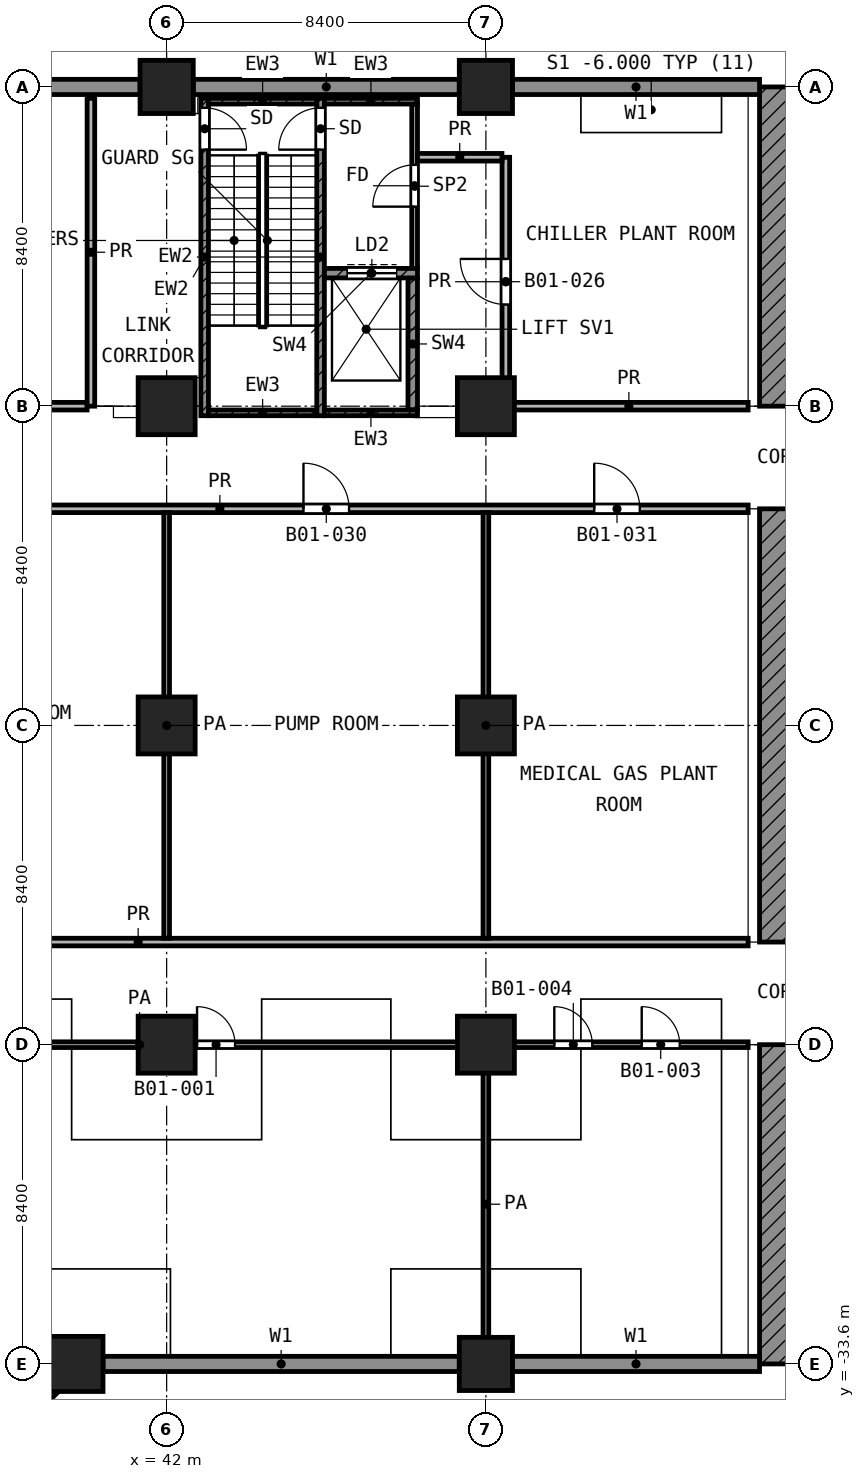
"""IFC4 building model, lengths in metres.
Left out: names, types, materials, properties, quantities, classifications, styles, units other than length and angle.
Written with IfcOpenShell. Run it as: python <this file> out.ifc"""

import sys

from ifc_helpers import new_model, si_unit, direction, frame, frame_2d, origin, origin_2d, place, context, subcontext, project, spatial, polyline, rectangle, outline, extrude, element, fill, save


model = new_model("IFC4")
c1 = context("Model", 3, precision=1e-05, world=origin(), true_north=direction((0.0, 1.0)))
c2 = subcontext(c1, "Body", "Model", "MODEL_VIEW")
j1 = project(units=[si_unit("LENGTHUNIT", "METRE"), si_unit("PLANEANGLEUNIT", "RADIAN")], contexts=[c1])
p1 = place(None, origin())
s1 = spatial("IfcSite", under=j1, at=p1, CompositionType="ELEMENT")
p2 = place(p1, origin())
s2 = spatial("IfcBuilding", under=s1, at=p2, CompositionType="ELEMENT")
p3 = place(p2, frame((0.0, 0.0, -6.0)))
s3 = spatial("IfcBuildingStorey", under=s2, at=p3, CompositionType="ELEMENT", Elevation=-6.0)
p4 = place(p3, origin())
e1 = element("IfcWall", 1, at=p4, inside=s3, PredefinedType="SOLIDWALL", context=c2, shape_type="SweptSolid", body=[
    extrude(outline(polyline([(41.3, -0.2), (34.3, -0.2), (34.3, 0.2), (41.3, 0.2), (41.3, -0.2)])), origin(), (0.0, 0.0, 1.0), 5.55),
])
e2 = element("IfcWall", 2, at=p4, inside=s3, PredefinedType="SOLIDWALL", context=c2, shape_type="SweptSolid", body=[
    extrude(outline(polyline([(49.7, -0.2), (42.7, -0.2), (42.7, 0.2), (49.7, 0.2), (49.7, -0.2)])), origin(), (0.0, 0.0, 1.0), 5.55),
])
e3 = element("IfcWall", 3, at=p4, inside=s3, PredefinedType="SOLIDWALL", context=c2, shape_type="SweptSolid", body=[
    extrude(outline(polyline([(57.6, -0.2), (51.1, -0.2), (51.1, 0.2), (57.6, 0.2), (57.6, -0.2)])), origin(), (0.0, 0.0, 1.0), 5.55),
])
e4 = element("IfcWall", 4, at=p4, inside=s3, PredefinedType="SOLIDWALL", context=c2, shape_type="SweptSolid", body=[
    extrude(outline(polyline([(40.325, -33.4), (49.7, -33.4), (49.7, -33.8), (40.325, -33.8), (40.325, -33.4)])), origin(), (0.0, 0.0, 1.0), 5.55),
])
e5 = element("IfcWall", 5, at=p4, inside=s3, PredefinedType="SOLIDWALL", context=c2, shape_type="SweptSolid", body=[
    extrude(outline(polyline([(51.1, -33.4), (57.6, -33.4), (57.6, -33.8), (51.1, -33.8), (51.1, -33.4)])), origin(), (0.0, 0.0, 1.0), 5.55),
])
e6 = element("IfcWall", 6, at=p4, inside=s3, PredefinedType="SOLIDWALL", context=c2, shape_type="SweptSolid", body=[
    extrude(outline(polyline([(34.325, -38.875), (34.042, -38.875), (38.875, -34.042), (38.875, -34.325), (39.158, -34.325), (34.325, -39.158), (34.325, -38.875)])), origin(), (0.0, 0.0, 1.0), 5.55),
])
for number, where, z_axis, x_axis in (
    (7, (42.0, 0.0, 0.0), (0.0, 0.0, 1.0), (1.0, 0.0, 0.0)),
    (8, (50.4, 0.0, 0.0), (0.0, 0.0, 1.0), (1.0, 0.0, 0.0)),
):
    element("IfcColumn", number, at=place(p3, frame(where, z_axis=z_axis, x_axis=x_axis)), inside=s3, PredefinedType="COLUMN", context=c2, shape_type="SweptSolid", body=[
        extrude(rectangle(XDim=1.4, YDim=1.4, at=origin_2d()), origin(), (0.0, 0.0, 1.0), 6.0),
    ])
for number, where, z_axis, x_axis in (
    (9, (42.0, -8.4, 0.0), (0.0, 0.0, 1.0), (1.0, 0.0, 0.0)),
    (10, (50.4, -8.4, 0.0), (0.0, 0.0, 1.0), (1.0, 0.0, 0.0)),
    (11, (42.0, -16.8, 0.0), (0.0, 0.0, 1.0), (1.0, 0.0, 0.0)),
    (12, (50.4, -16.8, 0.0), (0.0, 0.0, 1.0), (1.0, 0.0, 0.0)),
    (13, (42.0, -25.2, 0.0), (0.0, 0.0, 1.0), (1.0, 0.0, 0.0)),
    (14, (50.4, -25.2, 0.0), (0.0, 0.0, 1.0), (1.0, 0.0, 0.0)),
):
    element("IfcColumn", number, at=place(p3, frame(where, z_axis=z_axis, x_axis=x_axis)), inside=s3, PredefinedType="COLUMN", context=c2, shape_type="SweptSolid", body=[
        extrude(rectangle(XDim=1.5, YDim=1.5, at=origin_2d()), origin(), (0.0, 0.0, 1.0), 6.0),
    ])
p5 = place(p3, frame((39.6, -33.6, 0.0), z_axis=(0.0, 0.0, 1.0), x_axis=(1.0, 0.0, 0.0)))
e15 = element("IfcColumn", 15, at=p5, inside=s3, PredefinedType="COLUMN", context=c2, shape_type="SweptSolid", body=[
    extrude(rectangle(XDim=1.45, YDim=1.45, at=origin_2d()), origin(), (0.0, 0.0, 1.0), 6.0),
])
p6 = place(p3, frame((50.4, -33.6, 0.0), z_axis=(0.0, 0.0, 1.0), x_axis=(1.0, 0.0, 0.0)))
e16 = element("IfcColumn", 16, at=p6, inside=s3, PredefinedType="COLUMN", context=c2, shape_type="SweptSolid", body=[
    extrude(rectangle(XDim=1.4, YDim=1.4, at=origin_2d()), origin(), (0.0, 0.0, 1.0), 6.0),
])
p7 = place(p3, frame((0.0, 0.0, 6.0), z_axis=(0.0, -1.0, 0.0), x_axis=(1.0, 0.0, 0.0)))
e17 = element("IfcWall", 17, at=p7, inside=s3, PredefinedType="SHEAR", context=c2, shape_type="SweptSolid", body=[
    extrude(outline(polyline([(60.0, 0.0), (60.0, -6.0), (57.6, -6.0), (57.6, 0.0), (60.0, 0.0)])), origin(), (0.0, 0.0, 1.0), 8.4),
])
p8 = place(p3, frame((0.0, -11.1, 6.0), z_axis=(0.0, -1.0, 0.0), x_axis=(1.0, 0.0, 0.0)))
e18 = element("IfcWall", 18, at=p8, inside=s3, PredefinedType="SHEAR", context=c2, shape_type="SweptSolid", body=[
    extrude(outline(polyline([(60.0, 0.0), (60.0, -6.0), (57.6, -6.0), (57.6, 0.0), (60.0, 0.0)])), origin(), (0.0, 0.0, 1.0), 11.4),
])
p9 = place(p3, frame((0.0, -25.2, 6.0), z_axis=(0.0, -1.0, 0.0), x_axis=(1.0, 0.0, 0.0)))
e19 = element("IfcWall", 19, at=p9, inside=s3, PredefinedType="SHEAR", context=c2, shape_type="SweptSolid", body=[
    extrude(outline(polyline([(60.0, 0.0), (60.0, -6.0), (57.6, -6.0), (57.6, 0.0), (60.0, 0.0)])), origin(), (0.0, 0.0, 1.0), 8.4),
])
p10 = place(p3, frame((43.0, -8.65, 0.0), z_axis=(0.0, 0.0, 1.0), x_axis=(0.0, 1.0, 0.0)))
e20 = element("IfcWall", 20, at=p10, inside=s3, PredefinedType="SHEAR", context=c2, shape_type="SweptSolid", body=[
    extrude(rectangle(XDim=8.35, YDim=0.2, at=frame_2d((4.175, 0.0))), origin(), (0.0, 0.0, 1.0), 5.55),
])
p11 = place(p10, frame((7.0, 0.0, 0.0)))
e21 = element("IfcOpeningElement", 21, at=p11, cuts=e20, PredefinedType="OPENING", context=c2, shape_type="SweptSolid", body=[
    extrude(rectangle(XDim=1.1, YDim=2.1, at=frame_2d((0.55, 1.05))), frame((0.0, 0.11, 0.0), z_axis=(0.0, -1.0, 0.0), x_axis=(1.0, 0.0, 0.0)), (0.0, 0.0, 1.0), 0.22),
])
p12 = place(p3, frame((46.05, -8.65, 0.0), z_axis=(0.0, 0.0, 1.0), x_axis=(0.0, 1.0, 0.0)))
e22 = element("IfcWall", 22, at=p12, inside=s3, PredefinedType="SHEAR", context=c2, shape_type="SweptSolid", body=[
    extrude(rectangle(XDim=8.35, YDim=0.2, at=frame_2d((4.175, 0.0))), origin(), (0.0, 0.0, 1.0), 5.55),
])
p13 = place(p12, frame((7.0, 0.0, 0.0)))
e23 = element("IfcOpeningElement", 23, at=p13, cuts=e22, PredefinedType="OPENING", context=c2, shape_type="SweptSolid", body=[
    extrude(rectangle(XDim=1.1, YDim=2.1, at=frame_2d((0.55, 1.05))), frame((0.0, 0.11, 0.0), z_axis=(0.0, -1.0, 0.0), x_axis=(1.0, 0.0, 0.0)), (0.0, 0.0, 1.0), 0.22),
])
p14 = place(p3, frame((43.1, -0.375, 0.0), z_axis=(0.0, 0.0, 1.0), x_axis=(1.0, 0.0, 0.0)))
e24 = element("IfcWall", 24, at=p14, inside=s3, PredefinedType="SHEAR", context=c2, shape_type="SweptSolid", body=[
    extrude(rectangle(XDim=2.85, YDim=0.15, at=frame_2d((1.425, 0.0))), origin(), (0.0, 0.0, 1.0), 5.55),
])
p15 = place(p3, frame((46.15, -0.375, 0.0), z_axis=(0.0, 0.0, 1.0), x_axis=(1.0, 0.0, 0.0)))
e25 = element("IfcWall", 25, at=p15, inside=s3, PredefinedType="SHEAR", context=c2, shape_type="SweptSolid", body=[
    extrude(rectangle(XDim=2.45, YDim=0.15, at=frame_2d((1.225, 0.0))), origin(), (0.0, 0.0, 1.0), 5.55),
])
p16 = place(p3, frame((43.1, -8.575, 0.0), z_axis=(0.0, 0.0, 1.0), x_axis=(1.0, 0.0, 0.0)))
e26 = element("IfcWall", 26, at=p16, inside=s3, PredefinedType="SHEAR", context=c2, shape_type="SweptSolid", body=[
    extrude(rectangle(XDim=2.85, YDim=0.15, at=frame_2d((1.425, 0.0))), origin(), (0.0, 0.0, 1.0), 5.55),
])
p17 = place(p3, frame((46.15, -8.575, 0.0), z_axis=(0.0, 0.0, 1.0), x_axis=(1.0, 0.0, 0.0)))
e27 = element("IfcWall", 27, at=p17, inside=s3, PredefinedType="SHEAR", context=c2, shape_type="SweptSolid", body=[
    extrude(rectangle(XDim=2.45, YDim=0.15, at=frame_2d((1.225, 0.0))), origin(), (0.0, 0.0, 1.0), 5.55),
])
p18 = place(p3, frame((46.15, -4.9, 0.0), z_axis=(0.0, 0.0, 1.0), x_axis=(1.0, 0.0, 0.0)))
e28 = element("IfcWall", 28, at=p18, inside=s3, PredefinedType="SHEAR", context=c2, shape_type="SweptSolid", body=[
    extrude(rectangle(XDim=2.45, YDim=0.25, at=frame_2d((1.225, 0.0))), origin(), (0.0, 0.0, 1.0), 5.55),
])
p19 = place(p18, frame((0.6, 0.0, 0.0)))
e29 = element("IfcOpeningElement", 29, at=p19, cuts=e28, PredefinedType="OPENING", context=c2, shape_type="SweptSolid", body=[
    extrude(rectangle(XDim=1.3, YDim=2.1, at=frame_2d((0.65, 1.05))), frame((0.0, 0.135, 0.0), z_axis=(0.0, -1.0, 0.0), x_axis=(1.0, 0.0, 0.0)), (0.0, 0.0, 1.0), 0.27),
])
p20 = place(p3, frame((48.475, -8.5, 0.0), z_axis=(0.0, 0.0, 1.0), x_axis=(0.0, 1.0, 0.0)))
e30 = element("IfcWall", 30, at=p20, inside=s3, PredefinedType="SHEAR", context=c2, shape_type="SweptSolid", body=[
    extrude(rectangle(XDim=3.475, YDim=0.25, at=frame_2d((1.738, 0.0))), origin(), (0.0, 0.0, 1.0), 5.55),
])
p21 = place(p3, frame((48.525, -4.775, 0.0), z_axis=(0.0, 0.0, 1.0), x_axis=(0.0, 1.0, 0.0)))
e31 = element("IfcWall", 31, at=p21, inside=s3, PredefinedType="PARTITIONING", context=c2, shape_type="SweptSolid", body=[
    extrude(rectangle(XDim=4.325, YDim=0.15, at=frame_2d((2.163, 0.0))), origin(), (0.0, 0.0, 1.0), 5.55),
])
p22 = place(p21, frame((1.625, 0.0, 0.0)))
e32 = element("IfcOpeningElement", 32, at=p22, cuts=e31, PredefinedType="OPENING", context=c2, shape_type="SweptSolid", body=[
    extrude(rectangle(XDim=1.1, YDim=2.1, at=frame_2d((0.55, 1.05))), frame((0.0, 0.085, 0.0), z_axis=(0.0, -1.0, 0.0), x_axis=(1.0, 0.0, 0.0)), (0.0, 0.0, 1.0), 0.17),
])
p23 = place(p3, frame((25.275, -25.2, 0.0), z_axis=(0.0, 0.0, 1.0), x_axis=(1.0, 0.0, 0.0)))
e33 = element("IfcWall", 33, at=p23, inside=s3, PredefinedType="PARTITIONING", context=c2, shape_type="SweptSolid", body=[
    extrude(rectangle(XDim=32.025, YDim=0.15, at=frame_2d((16.013, 0.0))), origin(), (0.0, 0.0, 1.0), 5.55),
])
p24 = place(p23, frame((17.525, 0.0, 0.0)))
e34 = element("IfcOpeningElement", 34, at=p24, cuts=e33, PredefinedType="OPENING", context=c2, shape_type="SweptSolid", body=[
    extrude(rectangle(XDim=1.0, YDim=2.1, at=frame_2d((0.5, 1.05))), frame((0.0, 0.085, 0.0), z_axis=(0.0, -1.0, 0.0), x_axis=(1.0, 0.0, 0.0)), (0.0, 0.0, 1.0), 0.17),
])
p25 = place(p23, frame((6.525, 0.0, 0.0)))
e35 = element("IfcOpeningElement", 35, at=p25, cuts=e33, PredefinedType="OPENING", context=c2, shape_type="SweptSolid", body=[
    extrude(rectangle(XDim=1.0, YDim=2.1, at=frame_2d((0.5, 1.05))), frame((0.0, 0.085, 0.0), z_axis=(0.0, -1.0, 0.0), x_axis=(1.0, 0.0, 0.0)), (0.0, 0.0, 1.0), 0.17),
])
p26 = place(p23, frame((29.225, 0.0, 0.0)))
e36 = element("IfcOpeningElement", 36, at=p26, cuts=e33, PredefinedType="OPENING", context=c2, shape_type="SweptSolid", body=[
    extrude(rectangle(XDim=1.0, YDim=2.1, at=frame_2d((0.5, 1.05))), frame((0.0, 0.085, 0.0), z_axis=(0.0, -1.0, 0.0), x_axis=(1.0, 0.0, 0.0)), (0.0, 0.0, 1.0), 0.17),
])
p27 = place(p23, frame((26.925, 0.0, 0.0)))
e37 = element("IfcOpeningElement", 37, at=p27, cuts=e33, PredefinedType="OPENING", context=c2, shape_type="SweptSolid", body=[
    extrude(rectangle(XDim=1.0, YDim=2.1, at=frame_2d((0.5, 1.05))), frame((0.0, 0.085, 0.0), z_axis=(0.0, -1.0, 0.0), x_axis=(1.0, 0.0, 0.0)), (0.0, 0.0, 1.0), 0.17),
])
p28 = place(p3, frame((42.0, -22.4, 0.0), z_axis=(0.0, 0.0, 1.0), x_axis=(0.0, 1.0, 0.0)))
e38 = element("IfcWall", 38, at=p28, inside=s3, PredefinedType="PARTITIONING", context=c2, shape_type="SweptSolid", body=[
    extrude(rectangle(XDim=11.2, YDim=0.15, at=frame_2d((5.6, 0.0))), origin(), (0.0, 0.0, 1.0), 5.55),
])
p29 = place(p3, frame((50.4, -33.52, 0.0), z_axis=(0.0, 0.0, 1.0), x_axis=(0.0, 1.0, 0.0)))
e39 = element("IfcWall", 39, at=p29, inside=s3, PredefinedType="PARTITIONING", context=c2, shape_type="SweptSolid", body=[
    extrude(rectangle(XDim=8.245, YDim=0.15, at=frame_2d((4.123, 0.0))), origin(), (0.0, 0.0, 1.0), 5.55),
])
p30 = place(p3, frame((50.4, -22.4, 0.0), z_axis=(0.0, 0.0, 1.0), x_axis=(0.0, 1.0, 0.0)))
e40 = element("IfcWall", 40, at=p30, inside=s3, PredefinedType="PARTITIONING", context=c2, shape_type="SweptSolid", body=[
    extrude(rectangle(XDim=11.2, YDim=0.15, at=frame_2d((5.6, 0.0))), origin(), (0.0, 0.0, 1.0), 5.55),
])
p31 = place(p3, frame((25.2, -22.5, 0.0), z_axis=(0.0, 0.0, 1.0), x_axis=(1.0, 0.0, 0.0)))
e41 = element("IfcWall", 41, at=p31, inside=s3, PredefinedType="PARTITIONING", context=c2, shape_type="SweptSolid", body=[
    extrude(rectangle(XDim=32.1, YDim=0.2, at=frame_2d((16.05, 0.0))), origin(), (0.0, 0.0, 1.0), 5.55),
])
p32 = place(p31, frame((7.8, 0.0, 0.0)))
e42 = element("IfcOpeningElement", 42, at=p32, cuts=e41, PredefinedType="OPENING", context=c2, shape_type="SweptSolid", body=[
    extrude(rectangle(XDim=1.2, YDim=2.1, at=frame_2d((0.6, 1.05))), frame((0.0, 0.11, 0.0), z_axis=(0.0, -1.0, 0.0), x_axis=(1.0, 0.0, 0.0)), (0.0, 0.0, 1.0), 0.22),
])
p33 = place(p3, frame((29.5, -11.1, 0.0), z_axis=(0.0, 0.0, 1.0), x_axis=(1.0, 0.0, 0.0)))
e43 = element("IfcWall", 43, at=p33, inside=s3, PredefinedType="PARTITIONING", context=c2, shape_type="SweptSolid", body=[
    extrude(rectangle(XDim=27.8, YDim=0.2, at=frame_2d((13.9, 0.0))), origin(), (0.0, 0.0, 1.0), 5.55),
])
p34 = place(p33, frame((16.1, 0.0, 0.0)))
e44 = element("IfcOpeningElement", 44, at=p34, cuts=e43, PredefinedType="OPENING", context=c2, shape_type="SweptSolid", body=[
    extrude(rectangle(XDim=1.2, YDim=2.1, at=frame_2d((0.6, 1.05))), frame((0.0, 0.11, 0.0), z_axis=(0.0, -1.0, 0.0), x_axis=(1.0, 0.0, 0.0)), (0.0, 0.0, 1.0), 0.22),
])
p35 = place(p33, frame((23.75, 0.0, 0.0)))
e45 = element("IfcOpeningElement", 45, at=p35, cuts=e43, PredefinedType="OPENING", context=c2, shape_type="SweptSolid", body=[
    extrude(rectangle(XDim=1.2, YDim=2.1, at=frame_2d((0.6, 1.05))), frame((0.0, 0.11, 0.0), z_axis=(0.0, -1.0, 0.0), x_axis=(1.0, 0.0, 0.0)), (0.0, 0.0, 1.0), 0.22),
])
p36 = place(p3, frame((25.2, -8.4, 0.0), z_axis=(0.0, 0.0, 1.0), x_axis=(1.0, 0.0, 0.0)))
e46 = element("IfcWall", 46, at=p36, inside=s3, PredefinedType="PARTITIONING", context=c2, shape_type="SweptSolid", body=[
    extrude(rectangle(XDim=14.707, YDim=0.2, at=frame_2d((7.354, 0.0))), origin(), (0.0, 0.0, 1.0), 5.55),
])
p37 = place(p36, frame((6.404, 0.0, 0.0)))
e47 = element("IfcOpeningElement", 47, at=p37, cuts=e46, PredefinedType="OPENING", context=c2, shape_type="SweptSolid", body=[
    extrude(rectangle(XDim=1.2, YDim=2.1, at=frame_2d((0.6, 1.05))), frame((0.0, 0.11, 0.0), z_axis=(0.0, -1.0, 0.0), x_axis=(1.0, 0.0, 0.0)), (0.0, 0.0, 1.0), 0.22),
])
p38 = place(p3, frame((51.025, -8.4, 0.0), z_axis=(0.0, 0.0, 1.0), x_axis=(1.0, 0.0, 0.0)))
e48 = element("IfcWall", 48, at=p38, inside=s3, PredefinedType="PARTITIONING", context=c2, shape_type="SweptSolid", body=[
    extrude(rectangle(XDim=6.275, YDim=0.2, at=frame_2d((3.138, 0.0))), origin(), (0.0, 0.0, 1.0), 5.55),
])
p39 = place(p3, frame((48.6, -1.85, 0.0), z_axis=(0.0, 0.0, 1.0), x_axis=(1.0, 0.0, 0.0)))
e49 = element("IfcWall", 49, at=p39, inside=s3, PredefinedType="PARTITIONING", context=c2, shape_type="SweptSolid", body=[
    extrude(rectangle(XDim=2.223, YDim=0.2, at=frame_2d((1.111, 0.0))), origin(), (0.0, 0.0, 1.0), 5.55),
])
p40 = place(p3, frame((40.007, -8.4, 0.0), z_axis=(0.0, 0.0, 1.0), x_axis=(0.0, 1.0, 0.0)))
e50 = element("IfcWall", 50, at=p40, inside=s3, PredefinedType="PARTITIONING", context=c2, shape_type="SweptSolid", body=[
    extrude(rectangle(XDim=8.101, YDim=0.2, at=frame_2d((4.05, 0.0))), origin(), (0.0, 0.0, 1.0), 5.55),
])
p41 = place(p3, frame((50.925, -8.4, 0.0), z_axis=(0.0, 0.0, 1.0), x_axis=(0.0, 1.0, 0.0)))
e51 = element("IfcWall", 51, at=p41, inside=s3, PredefinedType="PARTITIONING", context=c2, shape_type="SweptSolid", body=[
    extrude(rectangle(XDim=6.549, YDim=0.2, at=frame_2d((3.274, 0.0))), origin(), (0.0, 0.0, 1.0), 5.55),
])
p42 = place(p41, frame((2.675, 0.0, 0.0)))
e52 = element("IfcOpeningElement", 52, at=p42, cuts=e51, PredefinedType="OPENING", context=c2, shape_type="SweptSolid", body=[
    extrude(rectangle(XDim=1.2, YDim=2.1, at=frame_2d((0.6, 1.05))), frame((0.0, 0.11, 0.0), z_axis=(0.0, -1.0, 0.0), x_axis=(1.0, 0.0, 0.0)), (0.0, 0.0, 1.0), 0.22),
])
p43 = place(p11, frame((1.1, 0.0, 0.0), z_axis=(0.0, 0.0, 1.0), x_axis=(-1.0, 0.0, 0.0)))
e53 = element("IfcDoor", 53, at=p43, inside=s3, OperationType="SINGLE_SWING_LEFT", PredefinedType="DOOR", context=c2, shape_type="SweptSolid", body=[
    extrude(rectangle(XDim=1.1, YDim=2.1, at=frame_2d((0.55, 1.05))), frame((0.0, 0.025, 0.0), z_axis=(0.0, -1.0, 0.0), x_axis=(1.0, 0.0, 0.0)), (0.0, 0.0, 1.0), 0.05),
])
fill(e21, e53)
p44 = place(p13, origin())
e54 = element("IfcDoor", 54, at=p44, inside=s3, OperationType="SINGLE_SWING_LEFT", PredefinedType="DOOR", context=c2, shape_type="SweptSolid", body=[
    extrude(rectangle(XDim=1.1, YDim=2.1, at=frame_2d((0.55, 1.05))), frame((0.0, 0.025, 0.0), z_axis=(0.0, -1.0, 0.0), x_axis=(1.0, 0.0, 0.0)), (0.0, 0.0, 1.0), 0.05),
])
fill(e23, e54)
p45 = place(p19, origin())
e55 = element("IfcDoor", 55, at=p45, inside=s3, OperationType="DOUBLE_DOOR_SLIDING", PredefinedType="DOOR", context=c2, shape_type="SweptSolid", body=[
    extrude(rectangle(XDim=1.3, YDim=2.1, at=frame_2d((0.65, 1.05))), frame((0.0, 0.025, 0.0), z_axis=(0.0, -1.0, 0.0), x_axis=(1.0, 0.0, 0.0)), (0.0, 0.0, 1.0), 0.05),
])
fill(e29, e55)
p46 = place(p22, origin())
e56 = element("IfcDoor", 56, at=p46, inside=s3, OperationType="SINGLE_SWING_LEFT", PredefinedType="DOOR", context=c2, shape_type="SweptSolid", body=[
    extrude(rectangle(XDim=1.1, YDim=2.1, at=frame_2d((0.55, 1.05))), frame((0.0, 0.025, 0.0), z_axis=(0.0, -1.0, 0.0), x_axis=(1.0, 0.0, 0.0)), (0.0, 0.0, 1.0), 0.05),
])
fill(e32, e56)
p47 = place(p42, origin())
e57 = element("IfcDoor", 57, at=p47, inside=s3, OperationType="SINGLE_SWING_RIGHT", PredefinedType="DOOR", context=c2, shape_type="SweptSolid", body=[
    extrude(rectangle(XDim=1.2, YDim=2.1, at=frame_2d((0.6, 1.05))), frame((0.0, 0.025, 0.0), z_axis=(0.0, -1.0, 0.0), x_axis=(1.0, 0.0, 0.0)), (0.0, 0.0, 1.0), 0.05),
])
fill(e52, e57)
p48 = place(p34, origin())
e58 = element("IfcDoor", 58, at=p48, inside=s3, OperationType="SINGLE_SWING_LEFT", PredefinedType="DOOR", context=c2, shape_type="SweptSolid", body=[
    extrude(rectangle(XDim=1.2, YDim=2.1, at=frame_2d((0.6, 1.05))), frame((0.0, 0.025, 0.0), z_axis=(0.0, -1.0, 0.0), x_axis=(1.0, 0.0, 0.0)), (0.0, 0.0, 1.0), 0.05),
])
fill(e44, e58)
p49 = place(p35, origin())
e59 = element("IfcDoor", 59, at=p49, inside=s3, OperationType="SINGLE_SWING_LEFT", PredefinedType="DOOR", context=c2, shape_type="SweptSolid", body=[
    extrude(rectangle(XDim=1.2, YDim=2.1, at=frame_2d((0.6, 1.05))), frame((0.0, 0.025, 0.0), z_axis=(0.0, -1.0, 0.0), x_axis=(1.0, 0.0, 0.0)), (0.0, 0.0, 1.0), 0.05),
])
fill(e45, e59)
p50 = place(p24, origin())
e60 = element("IfcDoor", 60, at=p50, inside=s3, OperationType="SINGLE_SWING_LEFT", PredefinedType="DOOR", context=c2, shape_type="SweptSolid", body=[
    extrude(rectangle(XDim=1.0, YDim=2.1, at=frame_2d((0.5, 1.05))), frame((0.0, 0.025, 0.0), z_axis=(0.0, -1.0, 0.0), x_axis=(1.0, 0.0, 0.0)), (0.0, 0.0, 1.0), 0.05),
])
fill(e34, e60)
p51 = place(p26, origin())
e61 = element("IfcDoor", 61, at=p51, inside=s3, OperationType="SINGLE_SWING_LEFT", PredefinedType="DOOR", context=c2, shape_type="SweptSolid", body=[
    extrude(rectangle(XDim=1.0, YDim=2.1, at=frame_2d((0.5, 1.05))), frame((0.0, 0.025, 0.0), z_axis=(0.0, -1.0, 0.0), x_axis=(1.0, 0.0, 0.0)), (0.0, 0.0, 1.0), 0.05),
])
fill(e36, e61)
p52 = place(p27, origin())
e62 = element("IfcDoor", 62, at=p52, inside=s3, OperationType="SINGLE_SWING_LEFT", PredefinedType="DOOR", context=c2, shape_type="SweptSolid", body=[
    extrude(rectangle(XDim=1.0, YDim=2.1, at=frame_2d((0.5, 1.05))), frame((0.0, 0.025, 0.0), z_axis=(0.0, -1.0, 0.0), x_axis=(1.0, 0.0, 0.0)), (0.0, 0.0, 1.0), 0.05),
])
fill(e37, e62)
save(model, sys.argv[1])
